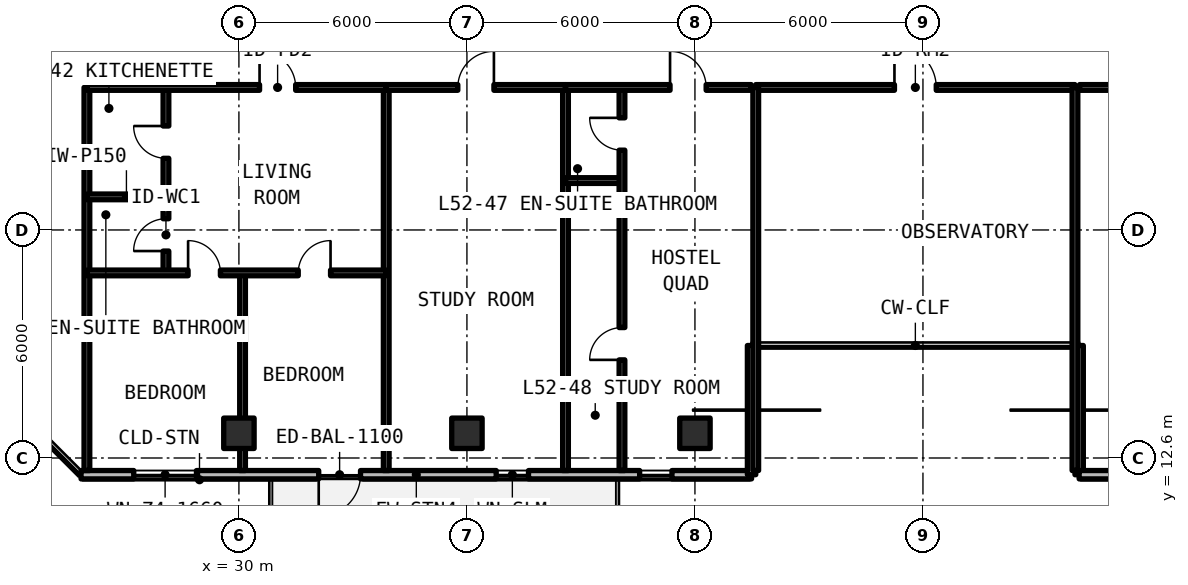
"""IFC4 building model, lengths in metres.
Left out: names, types, materials, properties, quantities, classifications, styles, units other than length and angle.
Written with IfcOpenShell. Run it as: python <this file> out.ifc"""

import sys

from ifc_helpers import new_model, si_unit, direction, frame, frame_2d, origin, origin_2d, place, context, subcontext, project, spatial, rectangle, extrude, element, fill, save


model = new_model("IFC4")
c1 = context("Model", 3, precision=1e-05, world=origin(), true_north=direction((0.0, 1.0)))
c2 = subcontext(c1, "Body", "Model", "MODEL_VIEW")
j1 = project(units=[si_unit("LENGTHUNIT", "METRE"), si_unit("PLANEANGLEUNIT", "RADIAN")], contexts=[c1])
p1 = place(None, origin())
s1 = spatial("IfcSite", under=j1, at=p1, CompositionType="ELEMENT")
p2 = place(p1, origin())
s2 = spatial("IfcBuilding", under=s1, at=p2, CompositionType="ELEMENT")
p3 = place(p2, frame((0.0, 0.0, 188.43)))
s3 = spatial("IfcBuildingStorey", under=s2, at=p3, CompositionType="ELEMENT", Elevation=188.43)
for number, where, z_axis, x_axis in (
    (1, (30.0, 13.25, 0.0), (0.0, 0.0, 1.0), (1.0, 0.0, 0.0)),
    (2, (36.0, 13.25, 0.0), (0.0, 0.0, 1.0), (1.0, 0.0, 0.0)),
    (3, (42.0, 13.25, 0.0), (0.0, 0.0, 1.0), (1.0, 0.0, 0.0)),
):
    element("IfcColumn", number, at=place(p3, frame(where, z_axis=z_axis, x_axis=x_axis)), inside=s3, PredefinedType="COLUMN", context=c2, shape_type="SweptSolid", body=[
        extrude(rectangle(XDim=0.8, YDim=0.8, at=origin_2d()), origin(), (0.0, 0.0, 1.0), 3.3),
    ])
p4 = place(p3, frame((25.846, 12.16, 0.0), z_axis=(0.0, 0.0, 1.0), x_axis=(1.0, 0.0, 0.0)))
e4 = element("IfcWall", 4, at=p4, inside=s3, PredefinedType="SOLIDWALL", context=c2, shape_type="SweptSolid", body=[
    extrude(rectangle(XDim=17.644, YDim=0.22, at=frame_2d((8.822, 0.0))), origin(), (0.0, 0.0, 1.0), 3.08),
])
p5 = place(p4, frame((6.254, 0.0, 0.0)))
e5 = element("IfcOpeningElement", 5, at=p5, cuts=e4, PredefinedType="OPENING", context=c2, shape_type="SweptSolid", body=[
    extrude(rectangle(XDim=1.1, YDim=2.15, at=frame_2d((0.55, 1.075))), frame((0.0, 0.12, 0.0), z_axis=(0.0, -1.0, 0.0), x_axis=(1.0, 0.0, 0.0)), (0.0, 0.0, 1.0), 0.24),
])
p6 = place(p4, frame((1.387, 0.0, 0.78)))
e6 = element("IfcOpeningElement", 6, at=p6, cuts=e4, PredefinedType="OPENING", context=c2, shape_type="SweptSolid", body=[
    extrude(rectangle(XDim=1.65, YDim=1.66, at=frame_2d((0.825, 0.83))), frame((0.0, 0.12, 0.0), z_axis=(0.0, -1.0, 0.0), x_axis=(1.0, 0.0, 0.0)), (0.0, 0.0, 1.0), 0.24),
])
p7 = place(p4, frame((10.925, 0.0, 0.78)))
e7 = element("IfcOpeningElement", 7, at=p7, cuts=e4, PredefinedType="OPENING", context=c2, shape_type="SweptSolid", body=[
    extrude(rectangle(XDim=0.85, YDim=1.65, at=frame_2d((0.425, 0.825))), frame((0.0, 0.12, 0.0), z_axis=(0.0, -1.0, 0.0), x_axis=(1.0, 0.0, 0.0)), (0.0, 0.0, 1.0), 0.24),
])
p8 = place(p4, frame((14.699, 0.0, 0.78)))
e8 = element("IfcOpeningElement", 8, at=p8, cuts=e4, PredefinedType="OPENING", context=c2, shape_type="SweptSolid", body=[
    extrude(rectangle(XDim=0.85, YDim=1.65, at=frame_2d((0.425, 0.825))), frame((0.0, 0.12, 0.0), z_axis=(0.0, -1.0, 0.0), x_axis=(1.0, 0.0, 0.0)), (0.0, 0.0, 1.0), 0.24),
])
for number, where, z_axis, x_axis in (
    (9, (43.49, 12.16, 0.0), (0.0, 0.0, 1.0), (0.0, 1.0, 0.0)),
    (10, (52.11, 15.56, 0.0), (0.0, 0.0, 1.0), (0.0, -1.0, 0.0)),
):
    element("IfcWall", number, at=place(p3, frame(where, z_axis=z_axis, x_axis=x_axis)), inside=s3, PredefinedType="SOLIDWALL", context=c2, shape_type="SweptSolid", body=[
        extrude(rectangle(XDim=3.4, YDim=0.22, at=frame_2d((1.7, 0.0))), origin(), (0.0, 0.0, 1.0), 3.08),
    ])
p9 = place(p3, frame((52.11, 12.16, 0.0), z_axis=(0.0, 0.0, 1.0), x_axis=(1.0, 0.0, 0.0)))
e11 = element("IfcWall", 11, at=p9, inside=s3, PredefinedType="SOLIDWALL", context=c2, shape_type="SweptSolid", body=[
    extrude(rectangle(XDim=43.244, YDim=0.22, at=frame_2d((21.622, 0.0))), origin(), (0.0, 0.0, 1.0), 3.08),
])
p10 = place(p9, frame((4.19, 0.0, 0.0)))
e12 = element("IfcOpeningElement", 12, at=p10, cuts=e11, PredefinedType="OPENING", context=c2, shape_type="SweptSolid", body=[
    extrude(rectangle(XDim=1.1, YDim=2.15, at=frame_2d((0.55, 1.075))), frame((0.0, 0.12, 0.0), z_axis=(0.0, -1.0, 0.0), x_axis=(1.0, 0.0, 0.0)), (0.0, 0.0, 1.0), 0.24),
])
p11 = place(p9, frame((17.54, 0.0, 0.0)))
e13 = element("IfcOpeningElement", 13, at=p11, cuts=e11, PredefinedType="OPENING", context=c2, shape_type="SweptSolid", body=[
    extrude(rectangle(XDim=1.1, YDim=2.15, at=frame_2d((0.55, 1.075))), frame((0.0, 0.12, 0.0), z_axis=(0.0, -1.0, 0.0), x_axis=(1.0, 0.0, 0.0)), (0.0, 0.0, 1.0), 0.24),
])
p12 = place(p9, frame((28.89, 0.0, 0.0)))
e14 = element("IfcOpeningElement", 14, at=p12, cuts=e11, PredefinedType="OPENING", context=c2, shape_type="SweptSolid", body=[
    extrude(rectangle(XDim=1.1, YDim=2.15, at=frame_2d((0.55, 1.075))), frame((0.0, 0.12, 0.0), z_axis=(0.0, -1.0, 0.0), x_axis=(1.0, 0.0, 0.0)), (0.0, 0.0, 1.0), 0.24),
])
p13 = place(p9, frame((8.66, 0.0, 0.78)))
e15 = element("IfcOpeningElement", 15, at=p13, cuts=e11, PredefinedType="OPENING", context=c2, shape_type="SweptSolid", body=[
    extrude(rectangle(XDim=1.65, YDim=1.66, at=frame_2d((0.825, 0.83))), frame((0.0, 0.12, 0.0), z_axis=(0.0, -1.0, 0.0), x_axis=(1.0, 0.0, 0.0)), (0.0, 0.0, 1.0), 0.24),
])
p14 = place(p9, frame((14.759, 0.0, 0.78)))
e16 = element("IfcOpeningElement", 16, at=p14, cuts=e11, PredefinedType="OPENING", context=c2, shape_type="SweptSolid", body=[
    extrude(rectangle(XDim=1.65, YDim=1.66, at=frame_2d((0.825, 0.83))), frame((0.0, 0.12, 0.0), z_axis=(0.0, -1.0, 0.0), x_axis=(1.0, 0.0, 0.0)), (0.0, 0.0, 1.0), 0.24),
])
p15 = place(p9, frame((32.902, 0.0, 0.78)))
e17 = element("IfcOpeningElement", 17, at=p15, cuts=e11, PredefinedType="OPENING", context=c2, shape_type="SweptSolid", body=[
    extrude(rectangle(XDim=1.65, YDim=1.66, at=frame_2d((0.825, 0.83))), frame((0.0, 0.12, 0.0), z_axis=(0.0, -1.0, 0.0), x_axis=(1.0, 0.0, 0.0)), (0.0, 0.0, 1.0), 0.24),
])
p16 = place(p9, frame((38.313, 0.0, 0.78)))
e18 = element("IfcOpeningElement", 18, at=p16, cuts=e11, PredefinedType="OPENING", context=c2, shape_type="SweptSolid", body=[
    extrude(rectangle(XDim=0.85, YDim=1.65, at=frame_2d((0.425, 0.825))), frame((0.0, 0.12, 0.0), z_axis=(0.0, -1.0, 0.0), x_axis=(1.0, 0.0, 0.0)), (0.0, 0.0, 1.0), 0.24),
])
p17 = place(p9, frame((40.615, 0.0, 0.78)))
e19 = element("IfcOpeningElement", 19, at=p17, cuts=e11, PredefinedType="OPENING", context=c2, shape_type="SweptSolid", body=[
    extrude(rectangle(XDim=1.65, YDim=1.66, at=frame_2d((0.825, 0.83))), frame((0.0, 0.12, 0.0), z_axis=(0.0, -1.0, 0.0), x_axis=(1.0, 0.0, 0.0)), (0.0, 0.0, 1.0), 0.24),
])
p18 = place(p3, frame((43.6, 22.35, 0.0), z_axis=(0.0, 0.0, 1.0), x_axis=(1.0, 0.0, 0.0)))
e20 = element("IfcWall", 20, at=p18, inside=s3, PredefinedType="SOLIDWALL", context=c2, shape_type="SweptSolid", body=[
    extrude(rectangle(XDim=8.4, YDim=0.15, at=frame_2d((4.2, 0.0))), origin(), (0.0, 0.0, 1.0), 2.35),
])
p19 = place(p18, frame((3.65, 0.0, 0.0)))
e21 = element("IfcOpeningElement", 21, at=p19, cuts=e20, PredefinedType="OPENING", context=c2, shape_type="SweptSolid", body=[
    extrude(rectangle(XDim=1.1, YDim=2.15, at=frame_2d((0.55, 1.075))), frame((0.0, 0.085, 0.0), z_axis=(0.0, -1.0, 0.0), x_axis=(1.0, 0.0, 0.0)), (0.0, 0.0, 1.0), 0.17),
])
for number, where, z_axis, x_axis in (
    (22, (43.6, 12.27, 0.0), (0.0, 0.0, 1.0), (0.0, 1.0, 0.0)),
    (23, (52.0, 12.27, 0.0), (0.0, 0.0, 1.0), (0.0, 1.0, 0.0)),
    (24, (26.0, 12.27, 0.0), (0.0, 0.0, 1.0), (0.0, 1.0, 0.0)),
    (25, (33.876, 12.27, 0.0), (0.0, 0.0, 1.0), (0.0, 1.0, 0.0)),
):
    element("IfcWall", number, at=place(p3, frame(where, z_axis=z_axis, x_axis=x_axis)), inside=s3, PredefinedType="SOLIDWALL", context=c2, shape_type="SweptSolid", body=[
        extrude(rectangle(XDim=10.08, YDim=0.15, at=frame_2d((5.04, 0.0))), origin(), (0.0, 0.0, 1.0), 2.35),
    ])
p20 = place(p3, frame((26.0, 19.471, 0.0), z_axis=(0.0, 0.0, 1.0), x_axis=(1.0, 0.0, 0.0)))
e26 = element("IfcWall", 26, at=p20, inside=s3, PredefinedType="PARTITIONING", context=c2, shape_type="SweptSolid", body=[
    extrude(rectangle(XDim=2.08, YDim=0.15, at=frame_2d((1.04, 0.0))), origin(), (0.0, 0.0, 1.0), 2.35),
])
p21 = place(p3, frame((28.08, 17.47, 0.0), z_axis=(0.0, 0.0, 1.0), x_axis=(0.0, 1.0, 0.0)))
e27 = element("IfcWall", 27, at=p21, inside=s3, PredefinedType="PARTITIONING", context=c2, shape_type="SweptSolid", body=[
    extrude(rectangle(XDim=4.88, YDim=0.15, at=frame_2d((2.44, 0.0))), origin(), (0.0, 0.0, 1.0), 2.35),
])
p22 = place(p21, frame((0.575, 0.0, 0.0)))
e28 = element("IfcOpeningElement", 28, at=p22, cuts=e27, PredefinedType="OPENING", context=c2, shape_type="SweptSolid", body=[
    extrude(rectangle(XDim=0.85, YDim=2.1, at=frame_2d((0.425, 1.05))), frame((0.0, 0.085, 0.0), z_axis=(0.0, -1.0, 0.0), x_axis=(1.0, 0.0, 0.0)), (0.0, 0.0, 1.0), 0.17),
])
p23 = place(p21, frame((3.015, 0.0, 0.0)))
e29 = element("IfcOpeningElement", 29, at=p23, cuts=e27, PredefinedType="OPENING", context=c2, shape_type="SweptSolid", body=[
    extrude(rectangle(XDim=0.85, YDim=2.1, at=frame_2d((0.425, 1.05))), frame((0.0, 0.085, 0.0), z_axis=(0.0, -1.0, 0.0), x_axis=(1.0, 0.0, 0.0)), (0.0, 0.0, 1.0), 0.17),
])
p24 = place(p3, frame((30.096, 12.27, 0.0), z_axis=(0.0, 0.0, 1.0), x_axis=(0.0, 1.0, 0.0)))
e30 = element("IfcWall", 30, at=p24, inside=s3, PredefinedType="PARTITIONING", context=c2, shape_type="SweptSolid", body=[
    extrude(rectangle(XDim=5.2, YDim=0.15, at=frame_2d((2.6, 0.0))), origin(), (0.0, 0.0, 1.0), 2.35),
])
p25 = place(p3, frame((26.0, 17.47, 0.0), z_axis=(0.0, 0.0, 1.0), x_axis=(1.0, 0.0, 0.0)))
e31 = element("IfcWall", 31, at=p25, inside=s3, PredefinedType="PARTITIONING", context=c2, shape_type="SweptSolid", body=[
    extrude(rectangle(XDim=7.876, YDim=0.15, at=frame_2d((3.938, 0.0))), origin(), (0.0, 0.0, 1.0), 2.35),
])
p26 = place(p25, frame((2.663, 0.0, 0.0)))
e32 = element("IfcOpeningElement", 32, at=p26, cuts=e31, PredefinedType="OPENING", context=c2, shape_type="SweptSolid", body=[
    extrude(rectangle(XDim=0.85, YDim=2.1, at=frame_2d((0.425, 1.05))), frame((0.0, 0.085, 0.0), z_axis=(0.0, -1.0, 0.0), x_axis=(1.0, 0.0, 0.0)), (0.0, 0.0, 1.0), 0.17),
])
p27 = place(p25, frame((5.561, 0.0, 0.0)))
e33 = element("IfcOpeningElement", 33, at=p27, cuts=e31, PredefinedType="OPENING", context=c2, shape_type="SweptSolid", body=[
    extrude(rectangle(XDim=0.85, YDim=2.1, at=frame_2d((0.425, 1.05))), frame((0.0, 0.085, 0.0), z_axis=(0.0, -1.0, 0.0), x_axis=(1.0, 0.0, 0.0)), (0.0, 0.0, 1.0), 0.17),
])
p28 = place(p3, frame((26.0, 22.35, 0.0), z_axis=(0.0, 0.0, 1.0), x_axis=(1.0, 0.0, 0.0)))
e34 = element("IfcWall", 34, at=p28, inside=s3, PredefinedType="SOLIDWALL", context=c2, shape_type="SweptSolid", body=[
    extrude(rectangle(XDim=7.876, YDim=0.15, at=frame_2d((3.938, 0.0))), origin(), (0.0, 0.0, 1.0), 2.35),
])
p29 = place(p28, frame((4.543, 0.0, 0.0)))
e35 = element("IfcOpeningElement", 35, at=p29, cuts=e34, PredefinedType="OPENING", context=c2, shape_type="SweptSolid", body=[
    extrude(rectangle(XDim=0.95, YDim=2.15, at=frame_2d((0.475, 1.075))), frame((0.0, 0.085, 0.0), z_axis=(0.0, -1.0, 0.0), x_axis=(1.0, 0.0, 0.0)), (0.0, 0.0, 1.0), 0.17),
])
p30 = place(p3, frame((38.594, 12.27, 0.0), z_axis=(0.0, 0.0, 1.0), x_axis=(0.0, 1.0, 0.0)))
e36 = element("IfcWall", 36, at=p30, inside=s3, PredefinedType="SOLIDWALL", context=c2, shape_type="SweptSolid", body=[
    extrude(rectangle(XDim=10.08, YDim=0.15, at=frame_2d((5.04, 0.0))), origin(), (0.0, 0.0, 1.0), 2.35),
])
p31 = place(p3, frame((33.876, 22.35, 0.0), z_axis=(0.0, 0.0, 1.0), x_axis=(1.0, 0.0, 0.0)))
e37 = element("IfcWall", 37, at=p31, inside=s3, PredefinedType="SOLIDWALL", context=c2, shape_type="SweptSolid", body=[
    extrude(rectangle(XDim=4.718, YDim=0.15, at=frame_2d((2.359, 0.0))), origin(), (0.0, 0.0, 1.0), 2.35),
])
p32 = place(p31, frame((1.884, 0.0, 0.0)))
e38 = element("IfcOpeningElement", 38, at=p32, cuts=e37, PredefinedType="OPENING", context=c2, shape_type="SweptSolid", body=[
    extrude(rectangle(XDim=0.95, YDim=2.15, at=frame_2d((0.475, 1.075))), frame((0.0, 0.085, 0.0), z_axis=(0.0, -1.0, 0.0), x_axis=(1.0, 0.0, 0.0)), (0.0, 0.0, 1.0), 0.17),
])
p33 = place(p3, frame((38.594, 19.9, 0.0), z_axis=(0.0, 0.0, 1.0), x_axis=(1.0, 0.0, 0.0)))
e39 = element("IfcWall", 39, at=p33, inside=s3, PredefinedType="PARTITIONING", context=c2, shape_type="SweptSolid", body=[
    extrude(rectangle(XDim=1.486, YDim=0.15, at=frame_2d((0.743, 0.0))), origin(), (0.0, 0.0, 1.0), 2.35),
])
p34 = place(p3, frame((40.08, 12.27, 0.0), z_axis=(0.0, 0.0, 1.0), x_axis=(0.0, 1.0, 0.0)))
e40 = element("IfcWall", 40, at=p34, inside=s3, PredefinedType="PARTITIONING", context=c2, shape_type="SweptSolid", body=[
    extrude(rectangle(XDim=10.08, YDim=0.15, at=frame_2d((5.04, 0.0))), origin(), (0.0, 0.0, 1.0), 2.35),
])
p35 = place(p34, frame((2.912, 0.0, 0.0)))
e41 = element("IfcOpeningElement", 41, at=p35, cuts=e40, PredefinedType="OPENING", context=c2, shape_type="SweptSolid", body=[
    extrude(rectangle(XDim=0.85, YDim=2.1, at=frame_2d((0.425, 1.05))), frame((0.0, 0.085, 0.0), z_axis=(0.0, -1.0, 0.0), x_axis=(1.0, 0.0, 0.0)), (0.0, 0.0, 1.0), 0.17),
])
p36 = place(p34, frame((8.43, 0.0, 0.0)))
e42 = element("IfcOpeningElement", 42, at=p36, cuts=e40, PredefinedType="OPENING", context=c2, shape_type="SweptSolid", body=[
    extrude(rectangle(XDim=0.85, YDim=2.1, at=frame_2d((0.425, 1.05))), frame((0.0, 0.085, 0.0), z_axis=(0.0, -1.0, 0.0), x_axis=(1.0, 0.0, 0.0)), (0.0, 0.0, 1.0), 0.17),
])
p37 = place(p3, frame((38.594, 22.35, 0.0), z_axis=(0.0, 0.0, 1.0), x_axis=(1.0, 0.0, 0.0)))
e43 = element("IfcWall", 43, at=p37, inside=s3, PredefinedType="SOLIDWALL", context=c2, shape_type="SweptSolid", body=[
    extrude(rectangle(XDim=4.886, YDim=0.15, at=frame_2d((2.443, 0.0))), origin(), (0.0, 0.0, 1.0), 2.35),
])
p38 = place(p37, frame((2.751, 0.0, 0.0)))
e44 = element("IfcOpeningElement", 44, at=p38, cuts=e43, PredefinedType="OPENING", context=c2, shape_type="SweptSolid", body=[
    extrude(rectangle(XDim=0.95, YDim=2.15, at=frame_2d((0.475, 1.075))), frame((0.0, 0.085, 0.0), z_axis=(0.0, -1.0, 0.0), x_axis=(1.0, 0.0, 0.0)), (0.0, 0.0, 1.0), 0.17),
])
p39 = place(p3, frame((52.12, 22.35, 0.0), z_axis=(0.0, 0.0, 1.0), x_axis=(1.0, 0.0, 0.0)))
e45 = element("IfcWall", 45, at=p39, inside=s3, PredefinedType="SOLIDWALL", context=c2, shape_type="SweptSolid", body=[
    extrude(rectangle(XDim=5.976, YDim=0.15, at=frame_2d((2.988, 0.0))), origin(), (0.0, 0.0, 1.0), 2.35),
])
p40 = place(p39, frame((2.513, 0.0, 0.0)))
e46 = element("IfcOpeningElement", 46, at=p40, cuts=e45, PredefinedType="OPENING", context=c2, shape_type="SweptSolid", body=[
    extrude(rectangle(XDim=0.95, YDim=2.15, at=frame_2d((0.475, 1.075))), frame((0.0, 0.085, 0.0), z_axis=(0.0, -1.0, 0.0), x_axis=(1.0, 0.0, 0.0)), (0.0, 0.0, 1.0), 0.17),
])
p41 = place(p5, frame((1.1, 0.0, 0.0), z_axis=(0.0, 0.0, 1.0), x_axis=(-1.0, 0.0, 0.0)))
e47 = element("IfcDoor", 47, at=p41, inside=s3, OperationType="SINGLE_SWING_LEFT", PredefinedType="DOOR", context=c2, shape_type="SweptSolid", body=[
    extrude(rectangle(XDim=1.1, YDim=2.15, at=frame_2d((0.55, 1.075))), frame((0.0, 0.025, 0.0), z_axis=(0.0, -1.0, 0.0), x_axis=(1.0, 0.0, 0.0)), (0.0, 0.0, 1.0), 0.05),
])
fill(e5, e47)
p42 = place(p6, origin())
e48 = element("IfcWindow", 48, at=p42, inside=s3, PartitioningType="SINGLE_PANEL", PredefinedType="WINDOW", context=c2, shape_type="SweptSolid", body=[
    extrude(rectangle(XDim=1.65, YDim=1.66, at=frame_2d((0.825, 0.83))), frame((0.0, 0.03, 0.0), z_axis=(0.0, -1.0, 0.0), x_axis=(1.0, 0.0, 0.0)), (0.0, 0.0, 1.0), 0.06),
])
fill(e6, e48)
p43 = place(p7, origin())
e49 = element("IfcWindow", 49, at=p43, inside=s3, PartitioningType="SINGLE_PANEL", PredefinedType="WINDOW", context=c2, shape_type="SweptSolid", body=[
    extrude(rectangle(XDim=0.85, YDim=1.65, at=frame_2d((0.425, 0.825))), frame((0.0, 0.03, 0.0), z_axis=(0.0, -1.0, 0.0), x_axis=(1.0, 0.0, 0.0)), (0.0, 0.0, 1.0), 0.06),
])
fill(e7, e49)
p44 = place(p8, origin())
e50 = element("IfcWindow", 50, at=p44, inside=s3, PartitioningType="SINGLE_PANEL", PredefinedType="WINDOW", context=c2, shape_type="SweptSolid", body=[
    extrude(rectangle(XDim=0.85, YDim=1.65, at=frame_2d((0.425, 0.825))), frame((0.0, 0.03, 0.0), z_axis=(0.0, -1.0, 0.0), x_axis=(1.0, 0.0, 0.0)), (0.0, 0.0, 1.0), 0.06),
])
fill(e8, e50)
p45 = place(p19, origin())
e51 = element("IfcDoor", 51, at=p45, inside=s3, OperationType="SINGLE_SWING_LEFT", PredefinedType="DOOR", context=c2, shape_type="SweptSolid", body=[
    extrude(rectangle(XDim=1.1, YDim=2.15, at=frame_2d((0.55, 1.075))), frame((0.0, 0.025, 0.0), z_axis=(0.0, -1.0, 0.0), x_axis=(1.0, 0.0, 0.0)), (0.0, 0.0, 1.0), 0.05),
])
fill(e21, e51)
p46 = place(p22, origin())
e52 = element("IfcDoor", 52, at=p46, inside=s3, OperationType="SINGLE_SWING_LEFT", PredefinedType="DOOR", context=c2, shape_type="SweptSolid", body=[
    extrude(rectangle(XDim=0.85, YDim=2.1, at=frame_2d((0.425, 1.05))), frame((0.0, 0.025, 0.0), z_axis=(0.0, -1.0, 0.0), x_axis=(1.0, 0.0, 0.0)), (0.0, 0.0, 1.0), 0.05),
])
fill(e28, e52)
p47 = place(p23, origin())
e53 = element("IfcDoor", 53, at=p47, inside=s3, OperationType="SINGLE_SWING_RIGHT", PredefinedType="DOOR", context=c2, shape_type="SweptSolid", body=[
    extrude(rectangle(XDim=0.85, YDim=2.1, at=frame_2d((0.425, 1.05))), frame((0.0, 0.025, 0.0), z_axis=(0.0, -1.0, 0.0), x_axis=(1.0, 0.0, 0.0)), (0.0, 0.0, 1.0), 0.05),
])
fill(e29, e53)
p48 = place(p26, origin())
e54 = element("IfcDoor", 54, at=p48, inside=s3, OperationType="SINGLE_SWING_LEFT", PredefinedType="DOOR", context=c2, shape_type="SweptSolid", body=[
    extrude(rectangle(XDim=0.85, YDim=2.1, at=frame_2d((0.425, 1.05))), frame((0.0, 0.025, 0.0), z_axis=(0.0, -1.0, 0.0), x_axis=(1.0, 0.0, 0.0)), (0.0, 0.0, 1.0), 0.05),
])
fill(e32, e54)
p49 = place(p27, origin())
e55 = element("IfcDoor", 55, at=p49, inside=s3, OperationType="SINGLE_SWING_RIGHT", PredefinedType="DOOR", context=c2, shape_type="SweptSolid", body=[
    extrude(rectangle(XDim=0.85, YDim=2.1, at=frame_2d((0.425, 1.05))), frame((0.0, 0.025, 0.0), z_axis=(0.0, -1.0, 0.0), x_axis=(1.0, 0.0, 0.0)), (0.0, 0.0, 1.0), 0.05),
])
fill(e33, e55)
p50 = place(p29, origin())
e56 = element("IfcDoor", 56, at=p50, inside=s3, OperationType="SINGLE_SWING_LEFT", PredefinedType="DOOR", context=c2, shape_type="SweptSolid", body=[
    extrude(rectangle(XDim=0.95, YDim=2.15, at=frame_2d((0.475, 1.075))), frame((0.0, 0.025, 0.0), z_axis=(0.0, -1.0, 0.0), x_axis=(1.0, 0.0, 0.0)), (0.0, 0.0, 1.0), 0.05),
])
fill(e35, e56)
p51 = place(p32, origin())
e57 = element("IfcDoor", 57, at=p51, inside=s3, OperationType="SINGLE_SWING_RIGHT", PredefinedType="DOOR", context=c2, shape_type="SweptSolid", body=[
    extrude(rectangle(XDim=0.95, YDim=2.15, at=frame_2d((0.475, 1.075))), frame((0.0, 0.025, 0.0), z_axis=(0.0, -1.0, 0.0), x_axis=(1.0, 0.0, 0.0)), (0.0, 0.0, 1.0), 0.05),
])
fill(e38, e57)
p52 = place(p35, origin())
e58 = element("IfcDoor", 58, at=p52, inside=s3, OperationType="SINGLE_SWING_LEFT", PredefinedType="DOOR", context=c2, shape_type="SweptSolid", body=[
    extrude(rectangle(XDim=0.85, YDim=2.1, at=frame_2d((0.425, 1.05))), frame((0.0, 0.025, 0.0), z_axis=(0.0, -1.0, 0.0), x_axis=(1.0, 0.0, 0.0)), (0.0, 0.0, 1.0), 0.05),
])
fill(e41, e58)
p53 = place(p36, origin())
e59 = element("IfcDoor", 59, at=p53, inside=s3, OperationType="SINGLE_SWING_RIGHT", PredefinedType="DOOR", context=c2, shape_type="SweptSolid", body=[
    extrude(rectangle(XDim=0.85, YDim=2.1, at=frame_2d((0.425, 1.05))), frame((0.0, 0.025, 0.0), z_axis=(0.0, -1.0, 0.0), x_axis=(1.0, 0.0, 0.0)), (0.0, 0.0, 1.0), 0.05),
])
fill(e42, e59)
p54 = place(p38, origin())
e60 = element("IfcDoor", 60, at=p54, inside=s3, OperationType="SINGLE_SWING_LEFT", PredefinedType="DOOR", context=c2, shape_type="SweptSolid", body=[
    extrude(rectangle(XDim=0.95, YDim=2.15, at=frame_2d((0.475, 1.075))), frame((0.0, 0.025, 0.0), z_axis=(0.0, -1.0, 0.0), x_axis=(1.0, 0.0, 0.0)), (0.0, 0.0, 1.0), 0.05),
])
fill(e44, e60)
save(model, sys.argv[1])
